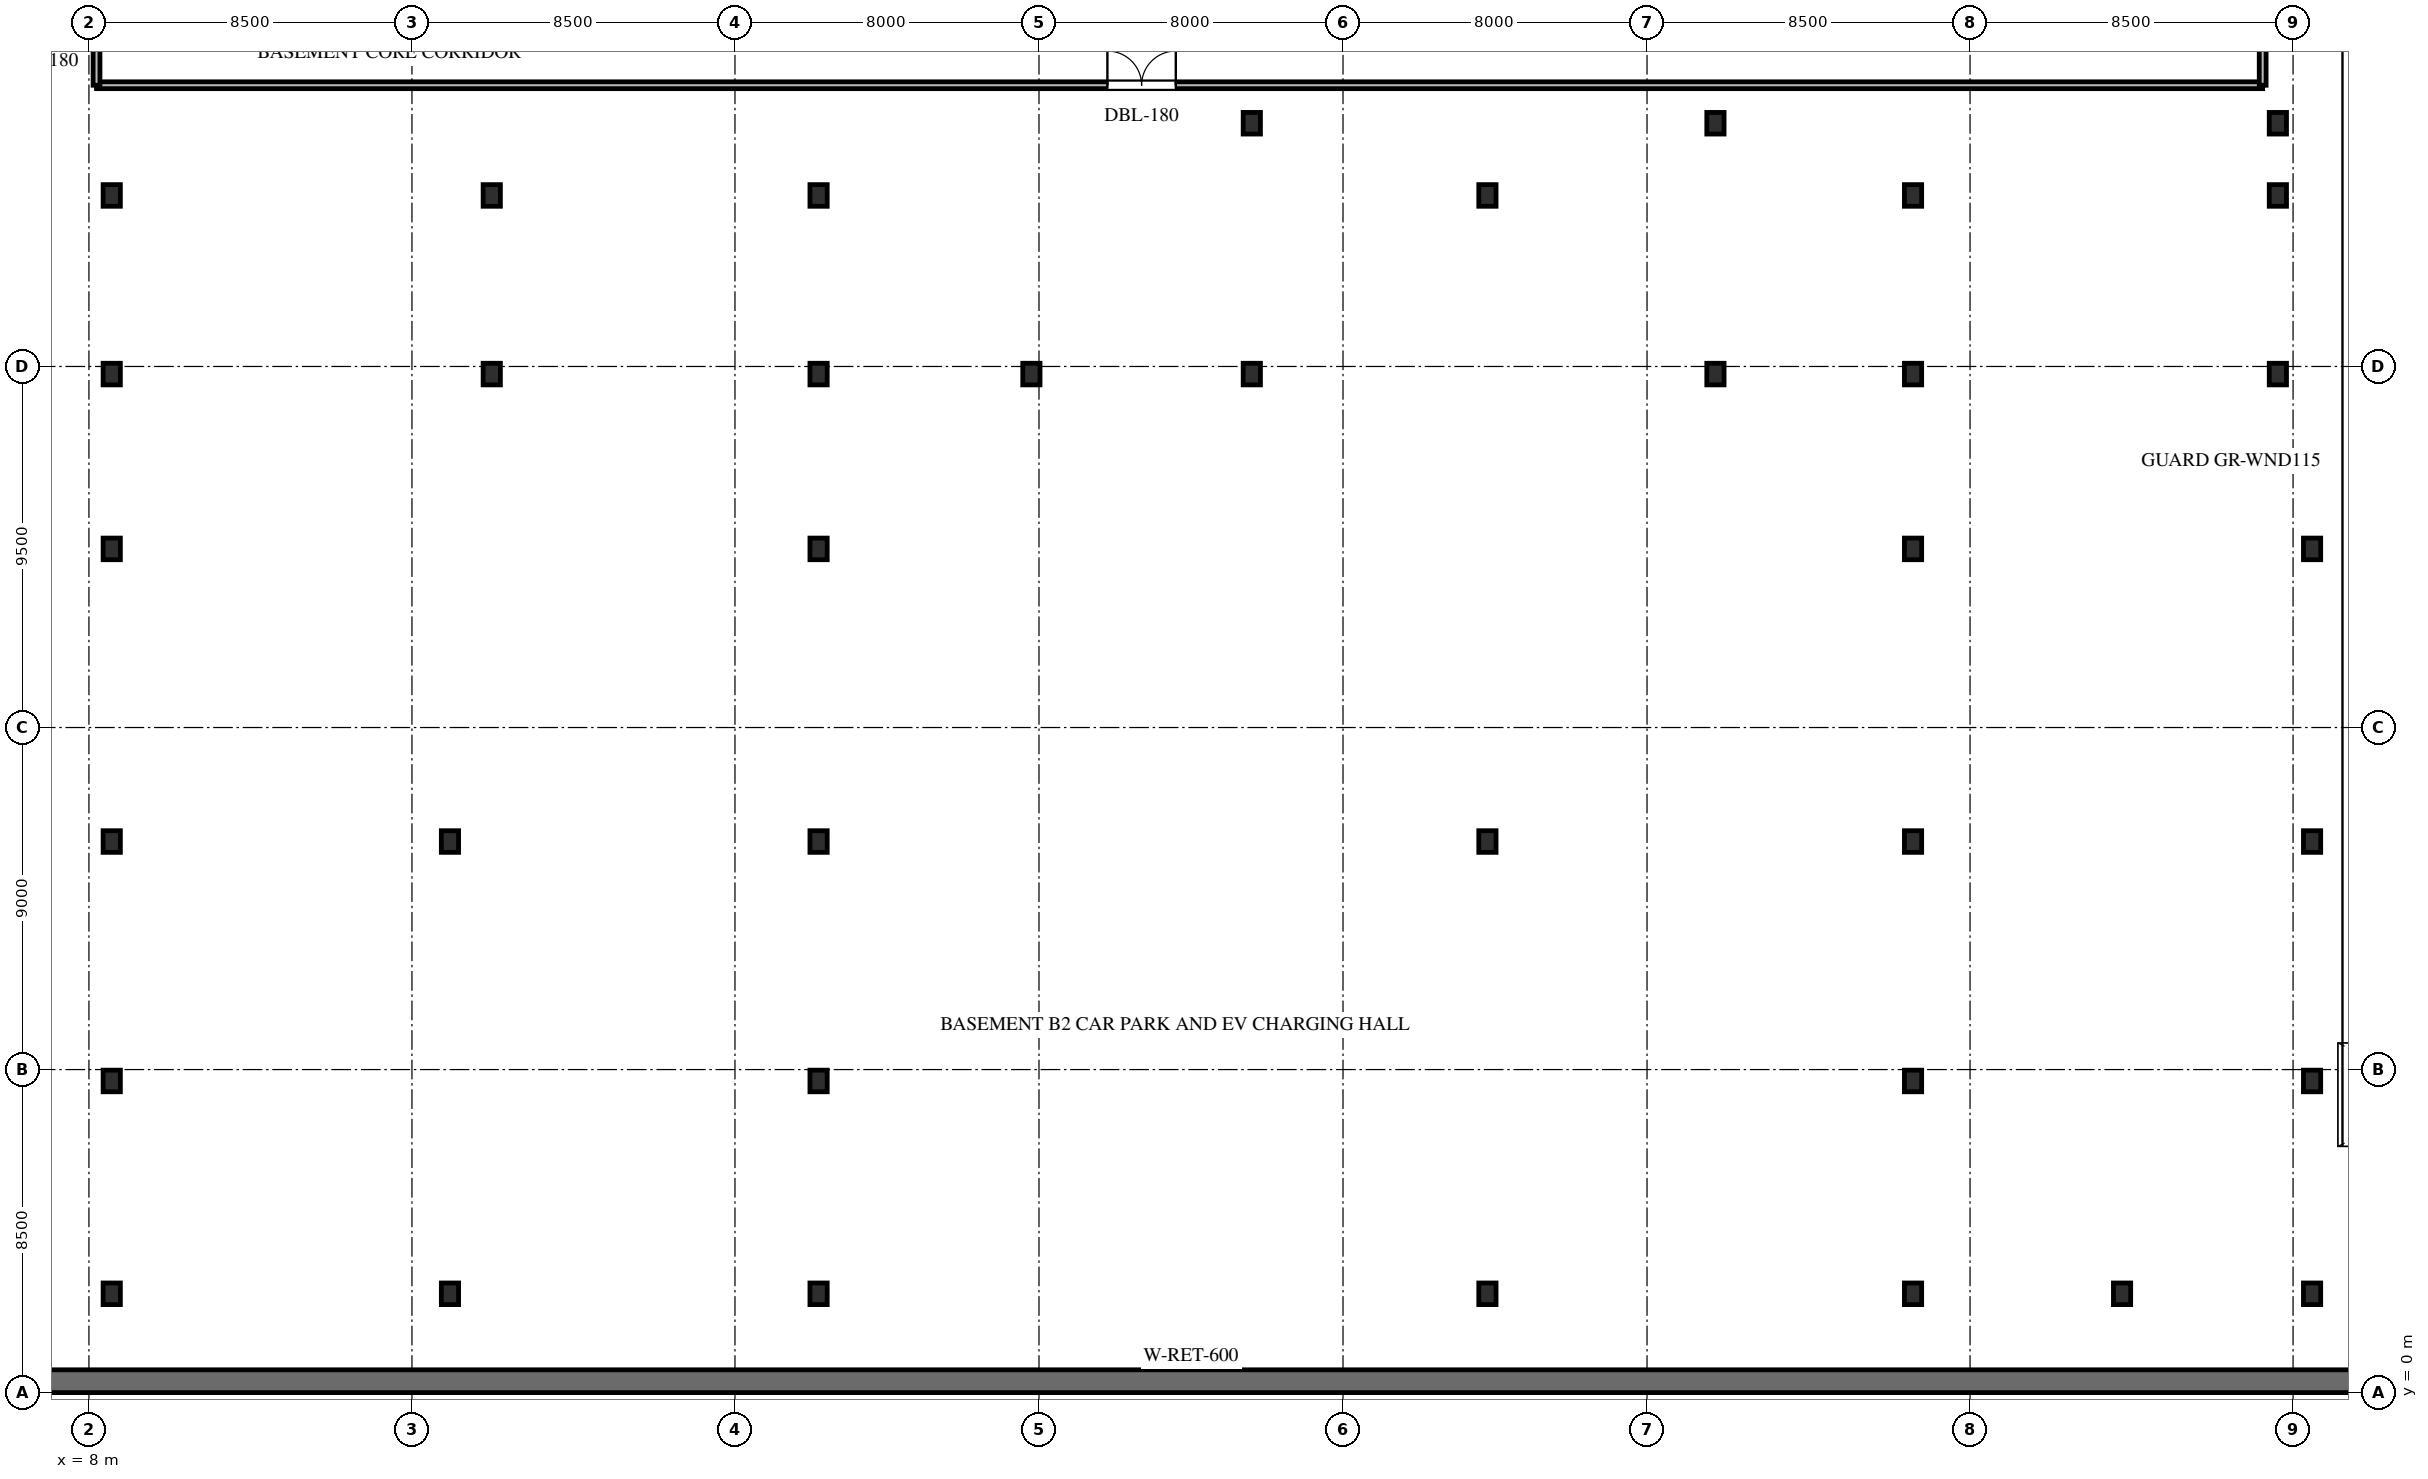
"""IFC4 building model, lengths in metres.
Left out: names, types, materials, properties, quantities, classifications, styles, units other than length and angle.
Written with IfcOpenShell. Run it as: python <this file> out.ifc"""

import sys

from ifc_helpers import new_model, si_unit, direction, frame, frame_2d, origin, origin_2d, place, context, subcontext, project, spatial, rectangle, i_section, extrude, element, fill, save


model = new_model("IFC4")
c1 = context("Model", 3, precision=1e-05, world=origin(), true_north=direction((0.0, 1.0)))
c2 = subcontext(c1, "Body", "Model", "MODEL_VIEW")
j1 = project(units=[si_unit("LENGTHUNIT", "METRE"), si_unit("PLANEANGLEUNIT", "RADIAN")], contexts=[c1])
p1 = place(None, origin())
s1 = spatial("IfcSite", under=j1, at=p1, CompositionType="ELEMENT")
p2 = place(p1, origin())
s2 = spatial("IfcBuilding", under=s1, at=p2, CompositionType="ELEMENT")
p3 = place(p2, frame((0.0, 0.0, -8.4)))
s3 = spatial("IfcBuildingStorey", under=s2, at=p3, CompositionType="ELEMENT", Elevation=-8.4)
p4 = place(p3, frame((0.0, 0.3, 0.0), z_axis=(0.0, 0.0, 1.0), x_axis=(1.0, 0.0, 0.0)))
e1 = element("IfcWall", 1, at=p4, inside=s3, PredefinedType="SOLIDWALL", context=c2, shape_type="SweptSolid", body=[
    extrude(rectangle(XDim=74.0, YDim=0.6, at=frame_2d((37.0, 0.0))), origin(), (0.0, 0.0, 1.0), 4.2),
])
for number, where, z_axis, x_axis in (
    (2, (8.6, 2.6, 0.0), (0.0, 0.0, 1.0), (1.0, 0.0, 0.0)),
    (3, (17.5, 2.6, 0.0), (0.0, 0.0, 1.0), (1.0, 0.0, 0.0)),
    (4, (27.2, 2.6, 0.0), (0.0, 0.0, 1.0), (1.0, 0.0, 0.0)),
    (5, (44.8, 2.6, 0.0), (0.0, 0.0, 1.0), (1.0, 0.0, 0.0)),
    (6, (56.0, 2.6, 0.0), (0.0, 0.0, 1.0), (1.0, 0.0, 0.0)),
    (7, (61.5, 2.6, 0.0), (0.0, 0.0, 1.0), (1.0, 0.0, 0.0)),
    (8, (66.5, 2.6, 0.0), (0.0, 0.0, 1.0), (1.0, 0.0, 0.0)),
    (9, (8.6, 8.2, 0.0), (0.0, 0.0, 1.0), (1.0, 0.0, 0.0)),
    (10, (27.2, 8.2, 0.0), (0.0, 0.0, 1.0), (1.0, 0.0, 0.0)),
    (11, (56.0, 8.2, 0.0), (0.0, 0.0, 1.0), (1.0, 0.0, 0.0)),
    (12, (66.5, 8.2, 0.0), (0.0, 0.0, 1.0), (1.0, 0.0, 0.0)),
    (13, (8.6, 14.5, 0.0), (0.0, 0.0, 1.0), (1.0, 0.0, 0.0)),
    (14, (17.5, 14.5, 0.0), (0.0, 0.0, 1.0), (1.0, 0.0, 0.0)),
    (15, (27.2, 14.5, 0.0), (0.0, 0.0, 1.0), (1.0, 0.0, 0.0)),
    (16, (44.8, 14.5, 0.0), (0.0, 0.0, 1.0), (1.0, 0.0, 0.0)),
    (17, (56.0, 14.5, 0.0), (0.0, 0.0, 1.0), (1.0, 0.0, 0.0)),
    (18, (66.5, 14.5, 0.0), (0.0, 0.0, 1.0), (1.0, 0.0, 0.0)),
    (19, (8.6, 22.2, 0.0), (0.0, 0.0, 1.0), (1.0, 0.0, 0.0)),
    (20, (27.2, 22.2, 0.0), (0.0, 0.0, 1.0), (1.0, 0.0, 0.0)),
    (21, (56.0, 22.2, 0.0), (0.0, 0.0, 1.0), (1.0, 0.0, 0.0)),
    (22, (66.5, 22.2, 0.0), (0.0, 0.0, 1.0), (1.0, 0.0, 0.0)),
    (23, (8.6, 26.8, 0.0), (0.0, 0.0, 1.0), (1.0, 0.0, 0.0)),
    (24, (18.6, 26.8, 0.0), (0.0, 0.0, 1.0), (1.0, 0.0, 0.0)),
    (25, (27.2, 26.8, 0.0), (0.0, 0.0, 1.0), (1.0, 0.0, 0.0)),
    (26, (32.8, 26.8, 0.0), (0.0, 0.0, 1.0), (1.0, 0.0, 0.0)),
    (27, (38.6, 26.8, 0.0), (0.0, 0.0, 1.0), (1.0, 0.0, 0.0)),
    (28, (50.8, 26.8, 0.0), (0.0, 0.0, 1.0), (1.0, 0.0, 0.0)),
    (29, (56.0, 26.8, 0.0), (0.0, 0.0, 1.0), (1.0, 0.0, 0.0)),
    (30, (65.6, 26.8, 0.0), (0.0, 0.0, 1.0), (1.0, 0.0, 0.0)),
    (31, (8.6, 31.5, 0.0), (0.0, 0.0, 1.0), (1.0, 0.0, 0.0)),
    (32, (18.6, 31.5, 0.0), (0.0, 0.0, 1.0), (1.0, 0.0, 0.0)),
    (33, (27.2, 31.5, 0.0), (0.0, 0.0, 1.0), (1.0, 0.0, 0.0)),
    (34, (44.8, 31.5, 0.0), (0.0, 0.0, 1.0), (1.0, 0.0, 0.0)),
    (35, (56.0, 31.5, 0.0), (0.0, 0.0, 1.0), (1.0, 0.0, 0.0)),
    (36, (65.6, 31.5, 0.0), (0.0, 0.0, 1.0), (1.0, 0.0, 0.0)),
    (37, (38.6, 33.4, 0.0), (0.0, 0.0, 1.0), (1.0, 0.0, 0.0)),
    (38, (50.8, 33.4, 0.0), (0.0, 0.0, 1.0), (1.0, 0.0, 0.0)),
    (39, (65.6, 33.4, 0.0), (0.0, 0.0, 1.0), (1.0, 0.0, 0.0)),
):
    element("IfcColumn", number, at=place(p3, frame(where, z_axis=z_axis, x_axis=x_axis)), inside=s3, PredefinedType="COLUMN", context=c2, shape_type="SweptSolid", body=[
        extrude(i_section(OverallWidth=0.454, OverallDepth=0.569, WebThickness=0.078, FlangeThickness=0.125, FilletRadius=0.03, at=origin_2d()), origin(), (0.0, 0.0, 1.0), 4.2),
    ])
p5 = place(p3, frame((8.2, 34.4, 0.0), z_axis=(0.0, 0.0, 1.0), x_axis=(1.0, 0.0, 0.0)))
e40 = element("IfcWall", 40, at=p5, inside=s3, PredefinedType="STANDARD", context=c2, shape_type="SweptSolid", body=[
    extrude(rectangle(XDim=57.0, YDim=0.18, at=frame_2d((28.5, 0.0))), origin(), (0.0, 0.0, 1.0), 2.952),
])
p6 = place(p5, frame((26.6, 0.0, 0.0)))
e41 = element("IfcOpeningElement", 41, at=p6, cuts=e40, PredefinedType="OPENING", context=c2, shape_type="SweptSolid", body=[
    extrude(rectangle(XDim=1.8, YDim=2.2, at=frame_2d((0.9, 1.1))), frame((0.0, 0.1, 0.0), z_axis=(0.0, -1.0, 0.0), x_axis=(1.0, 0.0, 0.0)), (0.0, 0.0, 1.0), 0.2),
])
p7 = place(p3, frame((8.2, 34.4, 0.0), z_axis=(0.0, 0.0, 1.0), x_axis=(0.0, 1.0, 0.0)))
e42 = element("IfcWall", 42, at=p7, inside=s3, PredefinedType="STANDARD", context=c2, shape_type="SweptSolid", body=[
    extrude(rectangle(XDim=3.65, YDim=0.18, at=frame_2d((1.825, 0.0))), origin(), (0.0, 0.0, 1.0), 2.952),
])
p8 = place(p3, frame((65.2, 34.4, 0.0), z_axis=(0.0, 0.0, 1.0), x_axis=(0.0, 1.0, 0.0)))
e43 = element("IfcWall", 43, at=p8, inside=s3, PredefinedType="STANDARD", context=c2, shape_type="SweptSolid", body=[
    extrude(rectangle(XDim=3.167, YDim=0.18, at=frame_2d((1.583, 0.0))), origin(), (0.0, 0.0, 1.0), 2.952),
])
p9 = place(p6, origin())
e44 = element("IfcDoor", 44, at=p9, inside=s3, OperationType="DOUBLE_DOOR_SINGLE_SWING", PredefinedType="DOOR", context=c2, shape_type="SweptSolid", body=[
    extrude(rectangle(XDim=1.8, YDim=2.2, at=frame_2d((0.9, 1.1))), frame((0.0, 0.025, 0.0), z_axis=(0.0, -1.0, 0.0), x_axis=(1.0, 0.0, 0.0)), (0.0, 0.0, 1.0), 0.05),
])
fill(e41, e44)
save(model, sys.argv[1])
